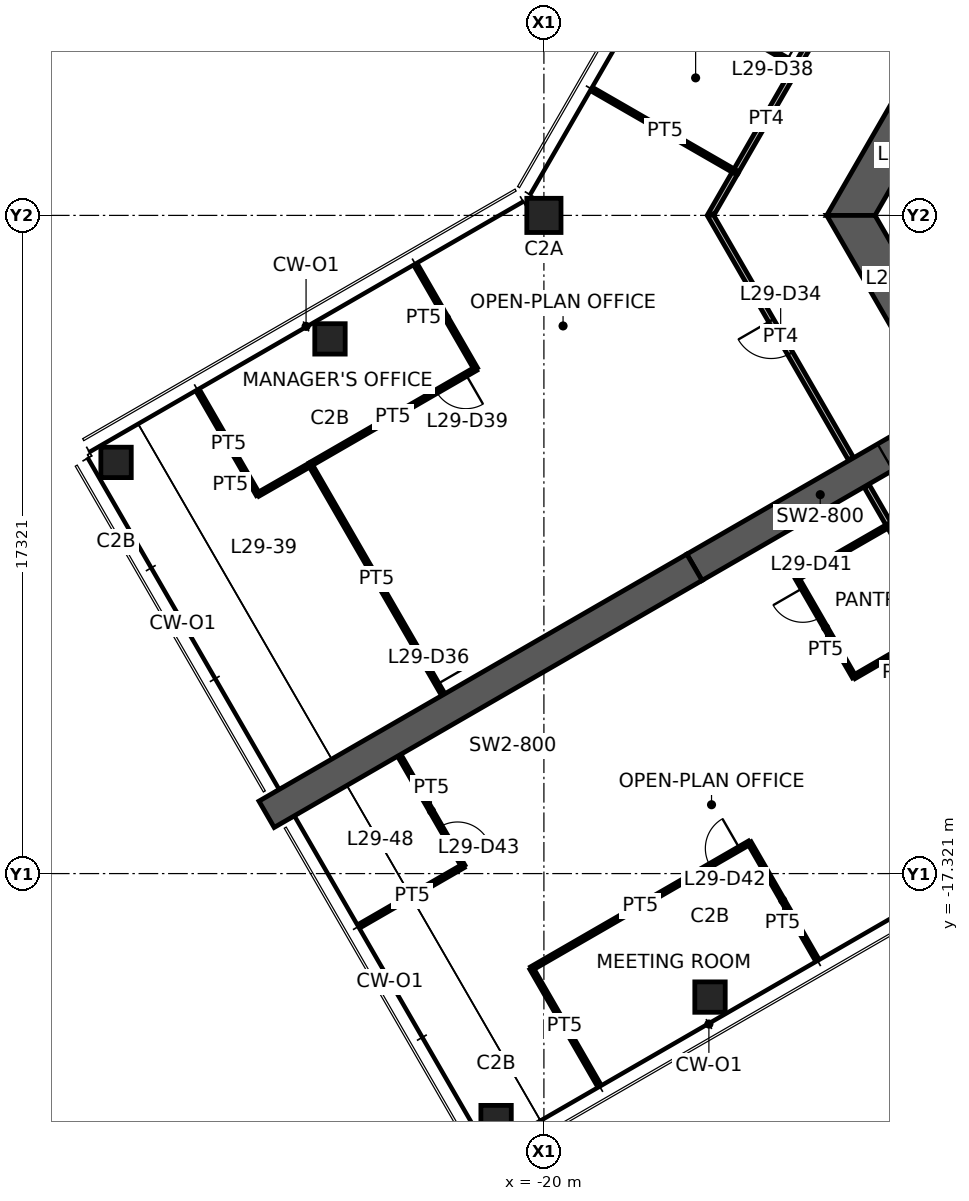
"""IFC4 building model, lengths in metres.
Left out: names, types, materials, properties, quantities, classifications, styles, units other than length and angle.
Written with IfcOpenShell. Run it as: python <this file> out.ifc"""

import sys

from ifc_helpers import new_model, si_unit, direction, frame, frame_2d, origin, origin_2d, place, context, subcontext, project, spatial, polyline, rectangle, hollow_rectangle, outline, extrude, element, fill, save


model = new_model("IFC4")
c1 = context("Model", 3, precision=1e-05, world=origin(), true_north=direction((0.0, 1.0)))
c2 = subcontext(c1, "Body", "Model", "MODEL_VIEW")
j1 = project(units=[si_unit("LENGTHUNIT", "METRE"), si_unit("PLANEANGLEUNIT", "RADIAN")], contexts=[c1])
p1 = place(None, origin())
s1 = spatial("IfcSite", under=j1, at=p1, CompositionType="ELEMENT")
p2 = place(p1, origin())
s2 = spatial("IfcBuilding", under=s1, at=p2, CompositionType="ELEMENT")
p3 = place(p2, frame((0.0, 0.0, 115.8)))
s3 = spatial("IfcBuildingStorey", under=s2, at=p3, CompositionType="ELEMENT", Elevation=115.8)
p4 = place(p3, frame((-20.0, 0.0, 0.0), z_axis=(0.0, 0.0, 1.0), x_axis=(1.0, 0.0, 0.0)))
e1 = element("IfcColumn", 1, at=p4, inside=s3, PredefinedType="COLUMN", context=c2, shape_type="SweptSolid", body=[
    extrude(hollow_rectangle(XDim=0.9, YDim=0.9, WallThickness=0.055, at=origin_2d()), origin(), (0.0, 0.0, 1.0), 3.9),
])
for number, where, z_axis, x_axis in (
    (2, (-25.629, -3.25, 0.0), (0.0, 0.0, 1.0), (1.0, 0.0, 0.0)),
    (3, (-31.258, -6.5, 0.0), (0.0, 0.0, 1.0), (1.0, 0.0, 0.0)),
    (4, (-15.629, -20.571, 0.0), (0.0, 0.0, 1.0), (1.0, 0.0, 0.0)),
    (5, (-21.258, -23.821, 0.0), (0.0, 0.0, 1.0), (1.0, 0.0, 0.0)),
):
    element("IfcColumn", number, at=place(p3, frame(where, z_axis=z_axis, x_axis=x_axis)), inside=s3, PredefinedType="COLUMN", context=c2, shape_type="SweptSolid", body=[
        extrude(hollow_rectangle(XDim=0.8, YDim=0.8, WallThickness=0.045, at=origin_2d()), origin(), (0.0, 0.0, 1.0), 3.9),
    ])
p5 = place(p3, frame((-5.961, 10.325, 0.0), z_axis=(0.0, 0.0, 1.0), x_axis=(-0.500004296715, -0.866022923061, 0.0)))
e6 = element("IfcWall", 6, at=p5, inside=s3, PredefinedType="SHEAR", context=c2, shape_type="SweptSolid", body=[
    extrude(outline(polyline([(-0.318, -0.55), (4.494, -0.55), (5.494, -0.55), (12.24, -0.55), (11.605, 0.55), (5.494, 0.55), (4.494, 0.55), (0.318, 0.55), (-0.318, -0.55)])), origin(), (0.0, 0.0, 1.0), 3.9),
])
p6 = place(p5, frame((4.494, 0.0, 0.0)))
e7 = element("IfcOpeningElement", 7, at=p6, cuts=e6, PredefinedType="OPENING", context=c2, shape_type="SweptSolid", body=[
    extrude(rectangle(XDim=1.0, YDim=2.1, at=frame_2d((0.5, 1.05))), frame((0.0, 0.56, 0.0), z_axis=(0.0, -1.0, 0.0), x_axis=(1.0, 0.0, 0.0)), (0.0, 0.0, 1.0), 1.12),
])
p7 = place(p3, frame((-11.922, 0.0, 0.0), z_axis=(0.0, 0.0, 1.0), x_axis=(0.500004296715, -0.866022923061, 0.0)))
e8 = element("IfcWall", 8, at=p7, inside=s3, PredefinedType="SHEAR", context=c2, shape_type="SweptSolid", body=[
    extrude(outline(polyline([(-0.318, -0.55), (6.381, -0.55), (7.181, -0.55), (12.24, -0.55), (11.605, 0.55), (7.181, 0.55), (6.381, 0.55), (0.318, 0.55), (-0.318, -0.55)])), origin(), (0.0, 0.0, 1.0), 3.9),
])
p8 = place(p7, frame((6.381, 0.0, 0.0)))
e9 = element("IfcOpeningElement", 9, at=p8, cuts=e8, PredefinedType="OPENING", context=c2, shape_type="SweptSolid", body=[
    extrude(rectangle(XDim=0.8, YDim=2.1, at=frame_2d((0.4, 1.05))), frame((0.0, 0.56, 0.0), z_axis=(0.0, -1.0, 0.0), x_axis=(1.0, 0.0, 0.0)), (0.0, 0.0, 1.0), 1.12),
])
p9 = place(p3, frame((-9.418, -5.438, 0.0), z_axis=(0.0, 0.0, 1.0), x_axis=(-0.866029782078, -0.499992416496, 0.0)))
e10 = element("IfcWall", 10, at=p9, inside=s3, PredefinedType="SHEAR", context=c2, shape_type="SweptSolid", body=[
    extrude(rectangle(XDim=7.646, YDim=0.8, at=frame_2d((3.823, 0.0))), origin(), (0.0, 0.0, 1.0), 3.9),
])
p10 = place(p9, frame((0.85, 0.0, 0.0)))
e11 = element("IfcOpeningElement", 11, at=p10, cuts=e10, PredefinedType="OPENING", context=c2, shape_type="SweptSolid", body=[
    extrude(rectangle(XDim=1.0, YDim=2.1, at=frame_2d((0.5, 1.05))), frame((0.0, 0.41, 0.0), z_axis=(0.0, -1.0, 0.0), x_axis=(1.0, 0.0, 0.0)), (0.0, 0.0, 1.0), 0.82),
])
p11 = place(p3, frame((-16.039, -9.26, 0.0), z_axis=(0.0, 0.0, 1.0), x_axis=(-0.866024837091, -0.50000098154, 0.0)))
e12 = element("IfcWall", 12, at=p11, inside=s3, PredefinedType="SHEAR", context=c2, shape_type="SweptSolid", body=[
    extrude(rectangle(XDim=13.0, YDim=0.8, at=frame_2d((6.5, 0.0))), origin(), (0.0, 0.0, 1.0), 3.9),
])
p12 = place(p3, frame((-14.962, 1.135, 0.0), z_axis=(0.0, 0.0, 1.0), x_axis=(0.500001520505, 0.866024525919, 0.0)))
e13 = element("IfcWall", 13, at=p12, inside=s3, PredefinedType="PARTITIONING", context=c2, shape_type="SweptSolid", body=[
    extrude(rectangle(XDim=3.256, YDim=0.15, at=frame_2d((1.628, 0.0))), origin(), (0.0, 0.0, 1.0), 2.95),
])
p13 = place(p3, frame((-15.617, 0.0, 0.0), z_axis=(0.0, 0.0, 1.0), x_axis=(0.499898558967, 0.866083962871, 0.0)))
e14 = element("IfcWall", 14, at=p13, inside=s3, PredefinedType="PARTITIONING", context=c2, shape_type="SweptSolid", body=[
    extrude(rectangle(XDim=1.32, YDim=0.15, at=frame_2d((0.66, 0.0))), origin(), (0.0, 0.0, 1.0), 2.95),
])
p14 = place(p3, frame((-11.923, -6.399, 0.0), z_axis=(0.0, 0.0, 1.0), x_axis=(-0.499980837837, 0.866036466782, 0.0)))
e15 = element("IfcWall", 15, at=p14, inside=s3, PredefinedType="PARTITIONING", context=c2, shape_type="SweptSolid", body=[
    extrude(rectangle(XDim=7.388, YDim=0.15, at=frame_2d((3.694, 0.0))), origin(), (0.0, 0.0, 1.0), 2.95),
])
p15 = place(p14, frame((3.194, 0.0, 0.0)))
e16 = element("IfcOpeningElement", 16, at=p15, cuts=e15, PredefinedType="OPENING", context=c2, shape_type="SweptSolid", body=[
    extrude(rectangle(XDim=1.0, YDim=2.1, at=frame_2d((0.5, 1.05))), frame((0.0, 0.085, 0.0), z_axis=(0.0, -1.0, 0.0), x_axis=(1.0, 0.0, 0.0)), (0.0, 0.0, 1.0), 0.17),
])
p16 = place(p3, frame((-13.338, 3.947, 0.0), z_axis=(0.0, 0.0, 1.0), x_axis=(0.49998791073, 0.866032383415, 0.0)))
e17 = element("IfcWall", 17, at=p16, inside=s3, PredefinedType="PARTITIONING", context=c2, shape_type="SweptSolid", body=[
    extrude(rectangle(XDim=6.502, YDim=0.15, at=frame_2d((3.251, 0.0))), origin(), (0.0, 0.0, 1.0), 2.95),
])
p17 = place(p16, frame((2.751, 0.0, 0.0)))
e18 = element("IfcOpeningElement", 18, at=p17, cuts=e17, PredefinedType="OPENING", context=c2, shape_type="SweptSolid", body=[
    extrude(rectangle(XDim=1.0, YDim=2.1, at=frame_2d((0.5, 1.05))), frame((0.0, 0.085, 0.0), z_axis=(0.0, -1.0, 0.0), x_axis=(1.0, 0.0, 0.0)), (0.0, 0.0, 1.0), 0.17),
])
p18 = place(p3, frame((-29.065, -4.68, 0.0), z_axis=(0.0, 0.0, 1.0), x_axis=(0.500120427123, -0.865955863987, 0.0)))
e19 = element("IfcWall", 19, at=p18, inside=s3, PredefinedType="PARTITIONING", context=c2, shape_type="SweptSolid", body=[
    extrude(rectangle(XDim=3.08, YDim=0.1, at=frame_2d((1.54, 0.0))), origin(), (0.0, 0.0, 1.0), 2.95),
])
p19 = place(p3, frame((-27.525, -7.347, 0.0), z_axis=(0.0, 0.0, 1.0), x_axis=(0.867571917523, 0.497311741191, 0.0)))
e20 = element("IfcWall", 20, at=p19, inside=s3, PredefinedType="PARTITIONING", context=c2, shape_type="SweptSolid", body=[
    extrude(rectangle(XDim=1.591, YDim=0.1, at=frame_2d((0.795, 0.0))), origin(), (0.0, 0.0, 1.0), 2.95),
])
p20 = place(p3, frame((-26.151, -6.554, 0.0), z_axis=(0.0, 0.0, 1.0), x_axis=(0.500528756763, -0.865719910625, 0.0)))
e21 = element("IfcWall", 21, at=p20, inside=s3, PredefinedType="PARTITIONING", context=c2, shape_type="SweptSolid", body=[
    extrude(rectangle(XDim=6.979, YDim=0.1, at=frame_2d((3.49, 0.0))), origin(), (0.0, 0.0, 1.0), 2.95),
])
p21 = place(p20, frame((5.78, 0.0, 0.0)))
e22 = element("IfcOpeningElement", 22, at=p21, cuts=e21, PredefinedType="OPENING", context=c2, shape_type="SweptSolid", body=[
    extrude(rectangle(XDim=0.9, YDim=2.1, at=frame_2d((0.45, 1.05))), frame((0.0, 0.06, 0.0), z_axis=(0.0, -1.0, 0.0), x_axis=(1.0, 0.0, 0.0)), (0.0, 0.0, 1.0), 0.12),
])
p22 = place(p3, frame((-14.957, 1.143, 0.0), z_axis=(0.0, 0.0, 1.0), x_axis=(-0.86652666665, 0.499130780441, 0.0)))
e23 = element("IfcWall", 23, at=p22, inside=s3, PredefinedType="PARTITIONING", context=c2, shape_type="SweptSolid", body=[
    extrude(rectangle(XDim=4.275, YDim=0.1, at=frame_2d((2.138, 0.0))), origin(), (0.0, 0.0, 1.0), 2.95),
])
p23 = place(p3, frame((-17.056, 6.099, 0.0), z_axis=(0.0, 0.0, 1.0), x_axis=(0.865505397626, -0.500899597405, 0.0)))
e24 = element("IfcWall", 24, at=p23, inside=s3, PredefinedType="PARTITIONING", context=c2, shape_type="SweptSolid", body=[
    extrude(rectangle(XDim=4.295, YDim=0.1, at=frame_2d((2.148, 0.0))), origin(), (0.0, 0.0, 1.0), 2.95),
])
p24 = place(p23, frame((3.095, 0.0, 0.0)))
e25 = element("IfcOpeningElement", 25, at=p24, cuts=e24, PredefinedType="OPENING", context=c2, shape_type="SweptSolid", body=[
    extrude(rectangle(XDim=0.9, YDim=2.1, at=frame_2d((0.45, 1.05))), frame((0.0, 0.06, 0.0), z_axis=(0.0, -1.0, 0.0), x_axis=(1.0, 0.0, 0.0)), (0.0, 0.0, 1.0), 0.12),
])
p25 = place(p3, frame((-23.332, -1.37, 0.0), z_axis=(0.0, 0.0, 1.0), x_axis=(0.499992328818, -0.866029832698, 0.0)))
e26 = element("IfcWall", 26, at=p25, inside=s3, PredefinedType="PARTITIONING", context=c2, shape_type="SweptSolid", body=[
    extrude(rectangle(XDim=3.08, YDim=0.1, at=frame_2d((1.54, 0.0))), origin(), (0.0, 0.0, 1.0), 2.95),
])
p26 = place(p3, frame((-21.792, -4.037, 0.0), z_axis=(0.0, 0.0, 1.0), x_axis=(-0.866037775365, -0.499978571182, 0.0)))
e27 = element("IfcWall", 27, at=p26, inside=s3, PredefinedType="PARTITIONING", context=c2, shape_type="SweptSolid", body=[
    extrude(rectangle(XDim=5.033, YDim=0.1, at=frame_2d((2.517, 0.0))), origin(), (0.0, 0.0, 1.0), 2.95),
])
p27 = place(p26, frame((0.3, 0.0, 0.0)))
e28 = element("IfcOpeningElement", 28, at=p27, cuts=e27, PredefinedType="OPENING", context=c2, shape_type="SweptSolid", body=[
    extrude(rectangle(XDim=0.9, YDim=2.1, at=frame_2d((0.45, 1.05))), frame((0.0, 0.06, 0.0), z_axis=(0.0, -1.0, 0.0), x_axis=(1.0, 0.0, 0.0)), (0.0, 0.0, 1.0), 0.12),
])
p28 = place(p3, frame((-9.41, -10.75, 0.0), z_axis=(0.0, 0.0, 1.0), x_axis=(-0.500038395149, 0.8660032352, 0.0)))
e29 = element("IfcWall", 29, at=p28, inside=s3, PredefinedType="PARTITIONING", context=c2, shape_type="SweptSolid", body=[
    extrude(rectangle(XDim=3.01, YDim=0.15, at=frame_2d((1.505, 0.0))), origin(), (0.0, 0.0, 1.0), 2.95),
])
p29 = place(p3, frame((-10.911, -8.152, 0.0), z_axis=(0.0, 0.0, 1.0), x_axis=(-0.499841408252, 0.866116947413, 0.0)))
e30 = element("IfcWall", 30, at=p29, inside=s3, PredefinedType="PARTITIONING", context=c2, shape_type="SweptSolid", body=[
    extrude(rectangle(XDim=1.185, YDim=0.15, at=frame_2d((0.592, 0.0))), origin(), (0.0, 0.0, 1.0), 2.95),
])
p30 = place(p3, frame((-13.338, -9.548, 0.0), z_axis=(0.0, 0.0, 1.0), x_axis=(0.866833758708, 0.498597267105, 0.0)))
e31 = element("IfcWall", 31, at=p30, inside=s3, PredefinedType="PARTITIONING", context=c2, shape_type="SweptSolid", body=[
    extrude(rectangle(XDim=2.8, YDim=0.1, at=frame_2d((1.4, 0.0))), origin(), (0.0, 0.0, 1.0), 2.95),
])
p31 = place(p3, frame((-11.838, -12.146, 0.0), z_axis=(0.0, 0.0, 1.0), x_axis=(-0.499990139034, 0.866031096941, 0.0)))
e32 = element("IfcWall", 32, at=p31, inside=s3, PredefinedType="PARTITIONING", context=c2, shape_type="SweptSolid", body=[
    extrude(rectangle(XDim=3.0, YDim=0.1, at=frame_2d((1.5, 0.0))), origin(), (0.0, 0.0, 1.0), 2.95),
])
p32 = place(p31, frame((1.8, 0.0, 0.0)))
e33 = element("IfcOpeningElement", 33, at=p32, cuts=e32, PredefinedType="OPENING", context=c2, shape_type="SweptSolid", body=[
    extrude(rectangle(XDim=0.9, YDim=2.1, at=frame_2d((0.45, 1.05))), frame((0.0, 0.06, 0.0), z_axis=(0.0, -1.0, 0.0), x_axis=(1.0, 0.0, 0.0)), (0.0, 0.0, 1.0), 0.12),
])
p33 = place(p3, frame((-9.415, -10.742, 0.0), z_axis=(0.0, 0.0, 1.0), x_axis=(-0.865195372903, -0.501434907746, 0.0)))
e34 = element("IfcWall", 34, at=p33, inside=s3, PredefinedType="PARTITIONING", context=c2, shape_type="SweptSolid", body=[
    extrude(rectangle(XDim=2.8, YDim=0.1, at=frame_2d((1.4, 0.0))), origin(), (0.0, 0.0, 1.0), 2.95),
])
p34 = place(p3, frame((-20.325, -19.817, 0.0), z_axis=(0.0, 0.0, 1.0), x_axis=(0.866037567856, 0.499978930619, 0.0)))
e35 = element("IfcWall", 35, at=p34, inside=s3, PredefinedType="PARTITIONING", context=c2, shape_type="SweptSolid", body=[
    extrude(rectangle(XDim=6.619, YDim=0.1, at=frame_2d((3.31, 0.0))), origin(), (0.0, 0.0, 1.0), 2.95),
])
p35 = place(p34, frame((5.42, 0.0, 0.0)))
e36 = element("IfcOpeningElement", 36, at=p35, cuts=e35, PredefinedType="OPENING", context=c2, shape_type="SweptSolid", body=[
    extrude(rectangle(XDim=0.9, YDim=2.1, at=frame_2d((0.45, 1.05))), frame((0.0, 0.06, 0.0), z_axis=(0.0, -1.0, 0.0), x_axis=(1.0, 0.0, 0.0)), (0.0, 0.0, 1.0), 0.12),
])
p36 = place(p3, frame((-18.585, -22.831, 0.0), z_axis=(0.0, 0.0, 1.0), x_axis=(-0.499979528911, 0.866037222451, 0.0)))
e37 = element("IfcWall", 37, at=p36, inside=s3, PredefinedType="PARTITIONING", context=c2, shape_type="SweptSolid", body=[
    extrude(rectangle(XDim=3.48, YDim=0.1, at=frame_2d((1.74, 0.0))), origin(), (0.0, 0.0, 1.0), 2.95),
])
p37 = place(p3, frame((-14.592, -16.508, 0.0), z_axis=(0.0, 0.0, 1.0), x_axis=(0.500010275428, -0.866019471182, 0.0)))
e38 = element("IfcWall", 38, at=p37, inside=s3, PredefinedType="PARTITIONING", context=c2, shape_type="SweptSolid", body=[
    extrude(rectangle(XDim=3.5, YDim=0.1, at=frame_2d((1.75, 0.0))), origin(), (0.0, 0.0, 1.0), 2.95),
])
p38 = place(p3, frame((-23.797, -14.224, 0.0), z_axis=(0.0, 0.0, 1.0), x_axis=(0.500015043844, -0.866016718043, 0.0)))
e39 = element("IfcWall", 39, at=p38, inside=s3, PredefinedType="PARTITIONING", context=c2, shape_type="SweptSolid", body=[
    extrude(rectangle(XDim=3.347, YDim=0.1, at=frame_2d((1.673, 0.0))), origin(), (0.0, 0.0, 1.0), 2.95),
])
p39 = place(p38, frame((2.147, 0.0, 0.0)))
e40 = element("IfcOpeningElement", 40, at=p39, cuts=e39, PredefinedType="OPENING", context=c2, shape_type="SweptSolid", body=[
    extrude(rectangle(XDim=0.9, YDim=2.1, at=frame_2d((0.45, 1.05))), frame((0.0, 0.06, 0.0), z_axis=(0.0, -1.0, 0.0), x_axis=(1.0, 0.0, 0.0)), (0.0, 0.0, 1.0), 0.12),
])
p40 = place(p3, frame((-22.123, -17.122, 0.0), z_axis=(0.0, 0.0, 1.0), x_axis=(-0.86602952684, -0.49999285859, 0.0)))
e41 = element("IfcWall", 41, at=p40, inside=s3, PredefinedType="PARTITIONING", context=c2, shape_type="SweptSolid", body=[
    extrude(rectangle(XDim=3.1, YDim=0.1, at=frame_2d((1.55, 0.0))), origin(), (0.0, 0.0, 1.0), 2.95),
])
p41 = place(p10, origin())
e42 = element("IfcDoor", 42, at=p41, inside=s3, OperationType="SINGLE_SWING_LEFT", PredefinedType="DOOR", context=c2, shape_type="SweptSolid", body=[
    extrude(rectangle(XDim=1.0, YDim=2.1, at=frame_2d((0.5, 1.05))), frame((0.0, 0.025, 0.0), z_axis=(0.0, -1.0, 0.0), x_axis=(1.0, 0.0, 0.0)), (0.0, 0.0, 1.0), 0.05),
])
fill(e11, e42)
p42 = place(p15, origin())
e43 = element("IfcDoor", 43, at=p42, inside=s3, OperationType="SINGLE_SWING_RIGHT", PredefinedType="DOOR", context=c2, shape_type="SweptSolid", body=[
    extrude(rectangle(XDim=1.0, YDim=2.1, at=frame_2d((0.5, 1.05))), frame((0.0, 0.025, 0.0), z_axis=(0.0, -1.0, 0.0), x_axis=(1.0, 0.0, 0.0)), (0.0, 0.0, 1.0), 0.05),
])
fill(e16, e43)
p43 = place(p21, origin())
e44 = element("IfcDoor", 44, at=p43, inside=s3, OperationType="SINGLE_SWING_RIGHT", PredefinedType="DOOR", context=c2, shape_type="SweptSolid", body=[
    extrude(rectangle(XDim=0.9, YDim=2.1, at=frame_2d((0.45, 1.05))), frame((0.0, 0.025, 0.0), z_axis=(0.0, -1.0, 0.0), x_axis=(1.0, 0.0, 0.0)), (0.0, 0.0, 1.0), 0.05),
])
fill(e22, e44)
p44 = place(p24, origin())
e45 = element("IfcDoor", 45, at=p44, inside=s3, OperationType="SINGLE_SWING_RIGHT", PredefinedType="DOOR", context=c2, shape_type="SweptSolid", body=[
    extrude(rectangle(XDim=0.9, YDim=2.1, at=frame_2d((0.45, 1.05))), frame((0.0, 0.025, 0.0), z_axis=(0.0, -1.0, 0.0), x_axis=(1.0, 0.0, 0.0)), (0.0, 0.0, 1.0), 0.05),
])
fill(e25, e45)
p45 = place(p27, origin())
e46 = element("IfcDoor", 46, at=p45, inside=s3, OperationType="SINGLE_SWING_LEFT", PredefinedType="DOOR", context=c2, shape_type="SweptSolid", body=[
    extrude(rectangle(XDim=0.9, YDim=2.1, at=frame_2d((0.45, 1.05))), frame((0.0, 0.025, 0.0), z_axis=(0.0, -1.0, 0.0), x_axis=(1.0, 0.0, 0.0)), (0.0, 0.0, 1.0), 0.05),
])
fill(e28, e46)
p46 = place(p32, origin())
e47 = element("IfcDoor", 47, at=p46, inside=s3, OperationType="SINGLE_SWING_RIGHT", PredefinedType="DOOR", context=c2, shape_type="SweptSolid", body=[
    extrude(rectangle(XDim=0.9, YDim=2.1, at=frame_2d((0.45, 1.05))), frame((0.0, 0.025, 0.0), z_axis=(0.0, -1.0, 0.0), x_axis=(1.0, 0.0, 0.0)), (0.0, 0.0, 1.0), 0.05),
])
fill(e33, e47)
p47 = place(p35, origin())
e48 = element("IfcDoor", 48, at=p47, inside=s3, OperationType="SINGLE_SWING_RIGHT", PredefinedType="DOOR", context=c2, shape_type="SweptSolid", body=[
    extrude(rectangle(XDim=0.9, YDim=2.1, at=frame_2d((0.45, 1.05))), frame((0.0, 0.025, 0.0), z_axis=(0.0, -1.0, 0.0), x_axis=(1.0, 0.0, 0.0)), (0.0, 0.0, 1.0), 0.05),
])
fill(e36, e48)
p48 = place(p39, origin())
e49 = element("IfcDoor", 49, at=p48, inside=s3, OperationType="SINGLE_SWING_RIGHT", PredefinedType="DOOR", context=c2, shape_type="SweptSolid", body=[
    extrude(rectangle(XDim=0.9, YDim=2.1, at=frame_2d((0.45, 1.05))), frame((0.0, 0.025, 0.0), z_axis=(0.0, -1.0, 0.0), x_axis=(1.0, 0.0, 0.0)), (0.0, 0.0, 1.0), 0.05),
])
fill(e40, e49)
save(model, sys.argv[1])
